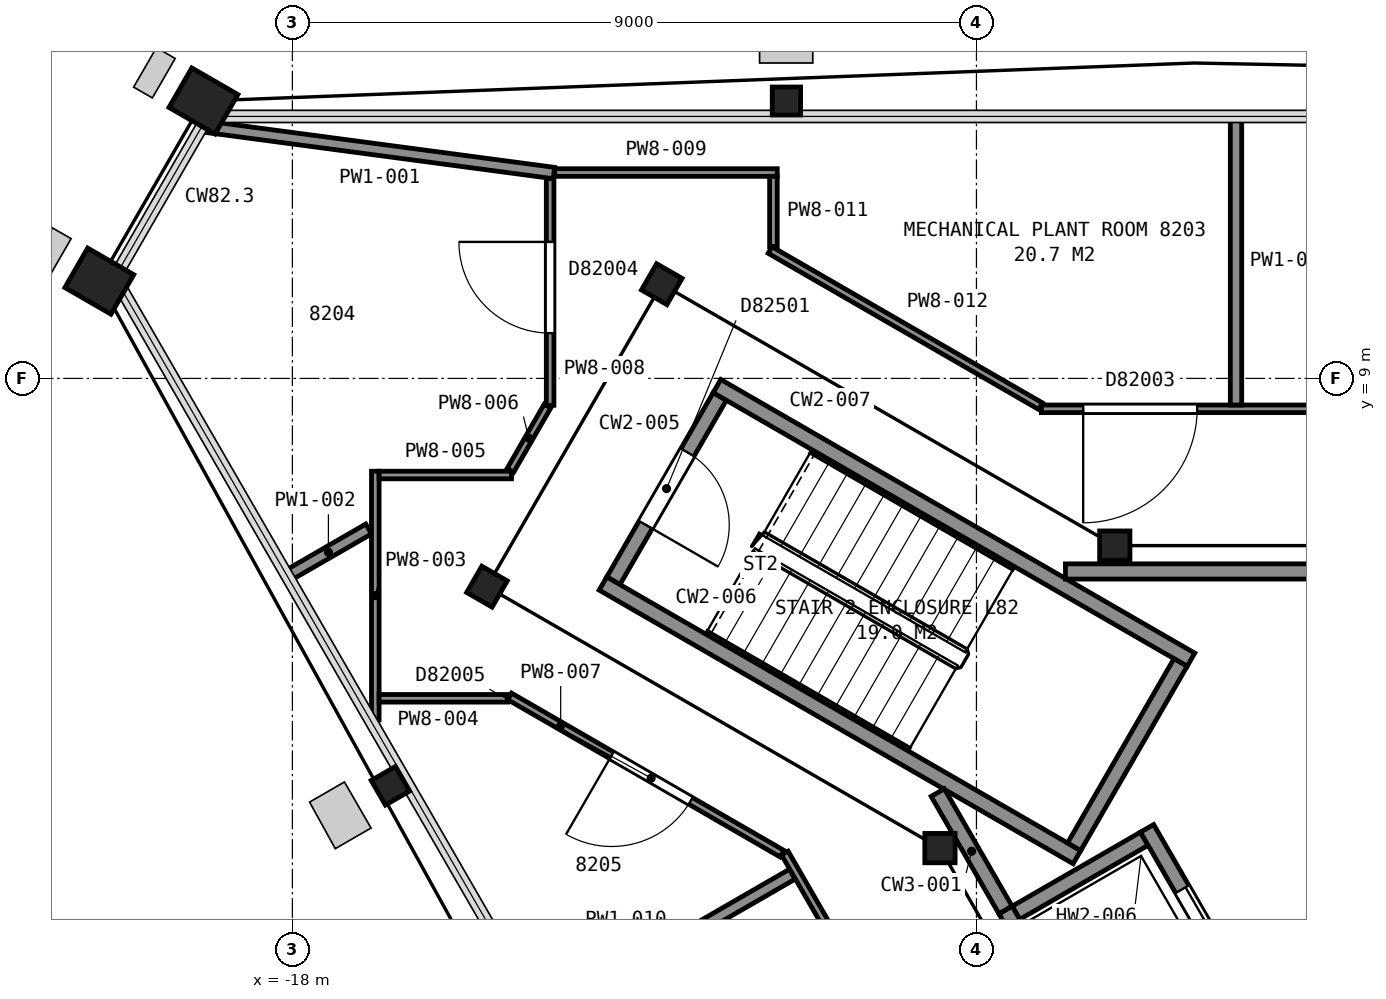
"""IFC4 building model, lengths in metres.
Left out: names, types, materials, properties, quantities, classifications, styles, units other than length and angle.
Written with IfcOpenShell. Run it as: python <this file> out.ifc"""

import sys

from ifc_helpers import new_model, si_unit, direction, frame, frame_2d, origin, origin_2d, place, context, subcontext, project, spatial, rectangle, hollow_rectangle, i_section, extrude, element, fill, save


model = new_model("IFC4")
c1 = context("Model", 3, precision=1e-05, world=origin(), true_north=direction((0.0, 1.0)))
c2 = subcontext(c1, "Body", "Model", "MODEL_VIEW")
j1 = project(units=[si_unit("LENGTHUNIT", "METRE"), si_unit("PLANEANGLEUNIT", "RADIAN")], contexts=[c1])
p1 = place(None, origin())
s1 = spatial("IfcSite", under=j1, at=p1, CompositionType="ELEMENT")
p2 = place(p1, origin())
s2 = spatial("IfcBuilding", under=s1, at=p2, CompositionType="ELEMENT")
p3 = place(p2, frame((0.0, 0.0, 325.2)))
s3 = spatial("IfcBuildingStorey", under=s2, at=p3, CompositionType="ELEMENT", Elevation=325.2)
p4 = place(p3, frame((-11.5, 12.65, 0.0), z_axis=(0.0, 0.0, 1.0), x_axis=(1.0, 0.0, 0.0)))
e1 = element("IfcColumn", 1, at=p4, inside=s3, PredefinedType="COLUMN", context=c2, shape_type="SweptSolid", body=[
    extrude(i_section(OverallWidth=0.373, OverallDepth=0.368, WebThickness=0.015, FlangeThickness=0.024, FilletRadius=0.015, at=origin_2d()), origin(), (0.0, 0.0, 1.0), 4.2),
])
for number, where, z_axis, x_axis in (
    (2, (-19.17, 12.65, 0.0), (0.0, 0.0, 1.0), (0.5, 0.866, 0.0)),
    (3, (-20.54, 10.28, 0.0), (0.0, 0.0, 1.0), (0.5, 0.866, 0.0)),
):
    element("IfcColumn", number, at=place(p3, frame(where, z_axis=z_axis, x_axis=x_axis)), inside=s3, PredefinedType="COLUMN", context=c2, shape_type="SweptSolid", body=[
        extrude(hollow_rectangle(XDim=0.6, YDim=0.7, WallThickness=0.04, at=origin_2d()), origin(), (0.0, 0.0, 1.0), 4.2),
    ])
p5 = place(p3, frame((-16.71, 3.64, 0.0), z_axis=(0.0, 0.0, 1.0), x_axis=(-0.5, 0.866025403784, 0.0)))
e4 = element("IfcColumn", 4, at=p5, inside=s3, PredefinedType="COLUMN", context=c2, shape_type="SweptSolid", body=[
    extrude(i_section(OverallWidth=0.373, OverallDepth=0.368, WebThickness=0.015, FlangeThickness=0.024, FilletRadius=0.015, at=origin_2d()), origin(), (0.0, 0.0, 1.0), 4.2),
])
for number, where, z_axis, x_axis in (
    (5, (-7.18, 6.8, 0.0), (0.0, 0.0, 1.0), (1.0, 0.0, 0.0)),
    (6, (-13.14, 10.24, 0.0), (0.0, 0.0, 1.0), (0.5, 0.866, 0.0)),
    (7, (-15.44, 6.26, 0.0), (0.0, 0.0, 1.0), (0.5, 0.866, 0.0)),
    (8, (-9.48, 2.82, 0.0), (0.0, 0.0, 1.0), (1.0, 0.0, 0.0)),
):
    element("IfcColumn", number, at=place(p3, frame(where, z_axis=z_axis, x_axis=x_axis)), inside=s3, PredefinedType="COLUMN", context=c2, shape_type="SweptSolid", body=[
        extrude(i_section(OverallWidth=0.399, OverallDepth=0.386, WebThickness=0.021, FlangeThickness=0.033, FilletRadius=0.015, at=origin_2d()), origin(), (0.0, 0.0, 1.0), 4.2),
    ])
p6 = place(p3, frame((-12.377, 8.762, 0.0), z_axis=(0.0, 0.0, 1.0), x_axis=(-0.500049511043, -0.865996816683, 0.0)))
e9 = element("IfcWall", 9, at=p6, inside=s3, PredefinedType="PARTITIONING", context=c2, shape_type="SweptSolid", body=[
    extrude(rectangle(XDim=2.8, YDim=0.2, at=frame_2d((1.4, 0.0))), origin(), (0.0, 0.0, 1.0), 3.95),
])
p7 = place(p6, frame((0.85, 0.0, 0.0)))
e10 = element("IfcOpeningElement", 10, at=p7, cuts=e9, PredefinedType="OPENING", context=c2, shape_type="SweptSolid", body=[
    extrude(rectangle(XDim=1.1, YDim=2.1, at=frame_2d((0.55, 1.05))), frame((0.0, 0.11, 0.0), z_axis=(0.0, -1.0, 0.0), x_axis=(1.0, 0.0, 0.0)), (0.0, 0.0, 1.0), 0.22),
])
for number, where, z_axis, x_axis in (
    (11, (-7.678, 2.701, 0.0), (0.0, 0.0, 1.0), (-0.866, 0.5, 0.0)),
    (12, (-6.178, 5.299, 0.0), (0.0, 0.0, 1.0), (-0.866, 0.5, 0.0)),
):
    element("IfcWall", number, at=place(p3, frame(where, z_axis=z_axis, x_axis=x_axis)), inside=s3, PredefinedType="PARTITIONING", context=c2, shape_type="SweptSolid", body=[
        extrude(rectangle(XDim=7.2, YDim=0.2, at=frame_2d((3.6, 0.0))), origin(), (0.0, 0.0, 1.0), 3.95),
    ])
p8 = place(p3, frame((-6.315, 5.262, 0.0), z_axis=(0.0, 0.0, 1.0), x_axis=(-0.500049511043, -0.865996816683, 0.0)))
e13 = element("IfcWall", 13, at=p8, inside=s3, PredefinedType="PARTITIONING", context=c2, shape_type="SweptSolid", body=[
    extrude(rectangle(XDim=2.8, YDim=0.2, at=frame_2d((1.4, 0.0))), origin(), (0.0, 0.0, 1.0), 3.95),
])
p9 = place(p3, frame((-8.48, 1.969, 0.0), z_axis=(0.0, 0.0, 1.0), x_axis=(0.866000020948, 0.500043961785, 0.0)))
e14 = element("IfcWall", 14, at=p9, inside=s3, PredefinedType="PARTITIONING", context=c2, shape_type="SweptSolid", body=[
    extrude(rectangle(XDim=1.95, YDim=0.2, at=frame_2d((0.975, 0.0))), origin(), (0.0, 0.0, 1.0), 4.2),
])
p10 = place(p3, frame((-5.28, 0.525, 0.0), z_axis=(0.0, 0.0, 1.0), x_axis=(-0.500037662692, 0.866003658127, 0.0)))
e15 = element("IfcWall", 15, at=p10, inside=s3, PredefinedType="PARTITIONING", context=c2, shape_type="SweptSolid", body=[
    extrude(rectangle(XDim=2.95, YDim=0.2, at=frame_2d((1.475, 0.0))), origin(), (0.0, 0.0, 1.0), 4.2),
])
p11 = place(p10, frame((0.925, 0.0, 0.0)))
e16 = element("IfcOpeningElement", 16, at=p11, cuts=e15, PredefinedType="OPENING", context=c2, shape_type="SweptSolid", body=[
    extrude(rectangle(XDim=1.1, YDim=2.1, at=frame_2d((0.55, 1.05))), frame((0.0, 0.11, 0.0), z_axis=(0.0, -1.0, 0.0), x_axis=(1.0, 0.0, 0.0)), (0.0, 0.0, 1.0), 0.22),
])
p12 = place(p3, frame((-7.142, -0.55, 0.0), z_axis=(0.0, 0.0, 1.0), x_axis=(-0.49997559174, 0.866039495442, 0.0)))
e17 = element("IfcWall", 17, at=p12, inside=s3, PredefinedType="PARTITIONING", context=c2, shape_type="SweptSolid", body=[
    extrude(rectangle(XDim=2.95, YDim=0.2, at=frame_2d((1.475, 0.0))), origin(), (0.0, 0.0, 1.0), 4.2),
])
p13 = place(p3, frame((-9.509, 3.551, 0.0), z_axis=(0.0, 0.0, 1.0), x_axis=(0.499999136801, -0.866025902152, 0.0)))
e18 = element("IfcWall", 18, at=p13, inside=s3, PredefinedType="PARTITIONING", context=c2, shape_type="SweptSolid", body=[
    extrude(rectangle(XDim=1.782, YDim=0.2, at=frame_2d((0.891, 0.0))), origin(), (0.0, 0.0, 1.0), 3.95),
])
p14 = place(p3, frame((7.829, 6.46, 0.0), z_axis=(0.0, 0.0, 1.0), x_axis=(-1.0, 0.0, 0.0)))
e19 = element("IfcWall", 19, at=p14, inside=s3, PredefinedType="PARTITIONING", context=c2, shape_type="SweptSolid", body=[
    extrude(rectangle(XDim=15.658, YDim=0.2, at=frame_2d((7.829, 0.0))), origin(), (0.0, 0.0, 1.0), 3.95),
])
p15 = place(p14, frame((2.618, 0.0, 0.0)))
e20 = element("IfcOpeningElement", 20, at=p15, cuts=e19, PredefinedType="OPENING", context=c2, shape_type="SweptSolid", body=[
    extrude(rectangle(XDim=1.8, YDim=2.1, at=frame_2d((0.9, 1.05))), frame((0.0, 0.11, 0.0), z_axis=(0.0, -1.0, 0.0), x_axis=(1.0, 0.0, 0.0)), (0.0, 0.0, 1.0), 0.22),
])
p16 = place(p3, frame((-19.143, 12.312, 0.0), z_axis=(0.0, 0.0, 1.0), x_axis=(0.991256927963, -0.131945832693, 0.0)))
e21 = element("IfcWall", 21, at=p16, inside=s3, PredefinedType="PARTITIONING", context=c2, shape_type="SweptSolid", body=[
    extrude(rectangle(XDim=4.624, YDim=0.15, at=frame_2d((2.312, 0.0))), origin(), (0.0, 0.0, 1.0), 3.297),
])
p17 = place(p3, frame((-18.056, 6.408, 0.0), z_axis=(0.0, 0.0, 1.0), x_axis=(0.865986110686, 0.500068051468, 0.0)))
e22 = element("IfcWall", 22, at=p17, inside=s3, PredefinedType="PARTITIONING", context=c2, shape_type="SweptSolid", body=[
    extrude(rectangle(XDim=1.223, YDim=0.15, at=frame_2d((0.611, 0.0))), origin(), (0.0, 0.0, 1.0), 3.297),
])
p18 = place(p3, frame((-16.909, 4.507, 0.0), z_axis=(0.0, 0.0, 1.0), x_axis=(0.0, 1.0, 0.0)))
e23 = element("IfcWall", 23, at=p18, inside=s3, PredefinedType="PARTITIONING", context=c2, shape_type="SweptSolid", body=[
    extrude(rectangle(XDim=3.272, YDim=0.1, at=frame_2d((1.636, 0.0))), origin(), (0.0, 0.0, 1.0), 3.297),
])
p19 = place(p3, frame((-16.859, 4.791, 0.0), z_axis=(0.0, 0.0, 1.0), x_axis=(1.0, 0.0, 0.0)))
e24 = element("IfcWall", 24, at=p19, inside=s3, PredefinedType="PARTITIONING", context=c2, shape_type="SweptSolid", body=[
    extrude(rectangle(XDim=1.691, YDim=0.1, at=frame_2d((0.845, 0.0))), origin(), (0.0, 0.0, 1.0), 3.297),
])
p20 = place(p3, frame((-16.859, 7.729, 0.0), z_axis=(0.0, 0.0, 1.0), x_axis=(1.0, 0.0, 0.0)))
e25 = element("IfcWall", 25, at=p20, inside=s3, PredefinedType="PARTITIONING", context=c2, shape_type="SweptSolid", body=[
    extrude(rectangle(XDim=1.742, YDim=0.1, at=frame_2d((0.871, 0.0))), origin(), (0.0, 0.0, 1.0), 3.297),
])
p21 = place(p3, frame((-15.132, 7.79, 0.0), z_axis=(0.0, 0.0, 1.0), x_axis=(0.499823463829, 0.866127303003, 0.0)))
e26 = element("IfcWall", 26, at=p21, inside=s3, PredefinedType="PARTITIONING", context=c2, shape_type="SweptSolid", body=[
    extrude(rectangle(XDim=0.976, YDim=0.1, at=frame_2d((0.488, 0.0))), origin(), (0.0, 0.0, 1.0), 3.297),
])
p22 = place(p3, frame((-11.557, 2.746, 0.0), z_axis=(0.0, 0.0, 1.0), x_axis=(-0.866005840187, 0.500033883614, 0.0)))
e27 = element("IfcWall", 27, at=p22, inside=s3, PredefinedType="PARTITIONING", context=c2, shape_type="SweptSolid", body=[
    extrude(rectangle(XDim=4.139, YDim=0.1, at=frame_2d((2.07, 0.0))), origin(), (0.0, 0.0, 1.0), 3.297),
])
p23 = place(p22, frame((1.389, 0.0, 0.0)))
e28 = element("IfcOpeningElement", 28, at=p23, cuts=e27, PredefinedType="OPENING", context=c2, shape_type="SweptSolid", body=[
    extrude(rectangle(XDim=1.2, YDim=2.1, at=frame_2d((0.6, 1.05))), frame((0.0, 0.06, 0.0), z_axis=(0.0, -1.0, 0.0), x_axis=(1.0, 0.0, 0.0)), (0.0, 0.0, 1.0), 0.12),
])
p24 = place(p3, frame((-14.609, 8.646, 0.0), z_axis=(0.0, 0.0, 1.0), x_axis=(0.0, 1.0, 0.0)))
e29 = element("IfcWall", 29, at=p24, inside=s3, PredefinedType="PARTITIONING", context=c2, shape_type="SweptSolid", body=[
    extrude(rectangle(XDim=2.983, YDim=0.1, at=frame_2d((1.491, 0.0))), origin(), (0.0, 0.0, 1.0), 3.297),
])
p25 = place(p24, frame((0.95, 0.0, 0.0)))
e30 = element("IfcOpeningElement", 30, at=p25, cuts=e29, PredefinedType="OPENING", context=c2, shape_type="SweptSolid", body=[
    extrude(rectangle(XDim=1.2, YDim=2.1, at=frame_2d((0.6, 1.05))), frame((0.0, 0.06, 0.0), z_axis=(0.0, -1.0, 0.0), x_axis=(1.0, 0.0, 0.0)), (0.0, 0.0, 1.0), 0.12),
])
p26 = place(p3, frame((-14.549, 11.709, 0.0), z_axis=(0.0, 0.0, 1.0), x_axis=(1.0, 0.0, 0.0)))
e31 = element("IfcWall", 31, at=p26, inside=s3, PredefinedType="PARTITIONING", context=c2, shape_type="SweptSolid", body=[
    extrude(rectangle(XDim=2.928, YDim=0.1, at=frame_2d((1.464, 0.0))), origin(), (0.0, 0.0, 1.0), 3.297),
])
p27 = place(p3, frame((-14.696, 0.588, 0.0), z_axis=(0.0, 0.0, 1.0), x_axis=(0.866115649152, 0.499843657852, 0.0)))
e32 = element("IfcWall", 32, at=p27, inside=s3, PredefinedType="PARTITIONING", context=c2, shape_type="SweptSolid", body=[
    extrude(rectangle(XDim=3.778, YDim=0.15, at=frame_2d((1.889, 0.0))), origin(), (0.0, 0.0, 1.0), 3.297),
])
p28 = place(p3, frame((-11.671, 10.734, 0.0), z_axis=(0.0, 0.0, 1.0), x_axis=(0.0, 1.0, 0.0)))
e33 = element("IfcWall", 33, at=p28, inside=s3, PredefinedType="PARTITIONING", context=c2, shape_type="SweptSolid", body=[
    extrude(rectangle(XDim=0.925, YDim=0.1, at=frame_2d((0.462, 0.0))), origin(), (0.0, 0.0, 1.0), 3.297),
])
p29 = place(p3, frame((-11.714, 10.689, 0.0), z_axis=(0.0, 0.0, 1.0), x_axis=(0.866029215606, -0.499993397673, 0.0)))
e34 = element("IfcWall", 34, at=p29, inside=s3, PredefinedType="PARTITIONING", context=c2, shape_type="SweptSolid", body=[
    extrude(rectangle(XDim=4.108, YDim=0.1, at=frame_2d((2.054, 0.0))), origin(), (0.0, 0.0, 1.0), 3.297),
])
p30 = place(p3, frame((-3.744, -10.714, 0.0), z_axis=(0.0, 0.0, 1.0), x_axis=(-0.500044034969, 0.86599997869, 0.0)))
e35 = element("IfcWall", 35, at=p30, inside=s3, PredefinedType="PARTITIONING", context=c2, shape_type="SweptSolid", body=[
    extrude(rectangle(XDim=15.553, YDim=0.1, at=frame_2d((7.776, 0.0))), origin(), (0.0, 0.0, 1.0), 3.297),
])
p31 = place(p30, frame((11.314, 0.0, 0.0)))
e36 = element("IfcOpeningElement", 36, at=p31, cuts=e35, PredefinedType="OPENING", context=c2, shape_type="SweptSolid", body=[
    extrude(rectangle(XDim=1.2, YDim=2.1, at=frame_2d((0.6, 1.05))), frame((0.0, 0.06, 0.0), z_axis=(0.0, -1.0, 0.0), x_axis=(1.0, 0.0, 0.0)), (0.0, 0.0, 1.0), 0.12),
])
p32 = place(p30, frame((4.593, 0.0, 0.0)))
e37 = element("IfcOpeningElement", 37, at=p32, cuts=e35, PredefinedType="OPENING", context=c2, shape_type="SweptSolid", body=[
    extrude(rectangle(XDim=1.2, YDim=2.1, at=frame_2d((0.6, 1.05))), frame((0.0, 0.06, 0.0), z_axis=(0.0, -1.0, 0.0), x_axis=(1.0, 0.0, 0.0)), (0.0, 0.0, 1.0), 0.12),
])
p33 = place(p3, frame((-8.146, 8.6, 0.0), z_axis=(0.0, 0.0, 1.0), x_axis=(1.0, 0.0, 0.0)))
e38 = element("IfcWall", 38, at=p33, inside=s3, PredefinedType="PARTITIONING", context=c2, shape_type="SweptSolid", body=[
    extrude(rectangle(XDim=16.292, YDim=0.1, at=frame_2d((8.146, 0.0))), origin(), (0.0, 0.0, 1.0), 3.297),
])
p34 = place(p33, frame((8.511, 0.0, 0.0)))
e39 = element("IfcOpeningElement", 39, at=p34, cuts=e38, PredefinedType="OPENING", context=c2, shape_type="SweptSolid", body=[
    extrude(rectangle(XDim=1.5, YDim=2.1, at=frame_2d((0.75, 1.05))), frame((0.0, 0.06, 0.0), z_axis=(0.0, -1.0, 0.0), x_axis=(1.0, 0.0, 0.0)), (0.0, 0.0, 1.0), 0.12),
])
p35 = place(p33, frame((0.55, 0.0, 0.0)))
e40 = element("IfcOpeningElement", 40, at=p35, cuts=e38, PredefinedType="OPENING", context=c2, shape_type="SweptSolid", body=[
    extrude(rectangle(XDim=1.5, YDim=2.1, at=frame_2d((0.75, 1.05))), frame((0.0, 0.06, 0.0), z_axis=(0.0, -1.0, 0.0), x_axis=(1.0, 0.0, 0.0)), (0.0, 0.0, 1.0), 0.12),
])
p36 = place(p3, frame((-5.585, 8.65, 0.0), z_axis=(0.0, 0.0, 1.0), x_axis=(0.0, 1.0, 0.0)))
e41 = element("IfcWall", 41, at=p36, inside=s3, PredefinedType="PARTITIONING", context=c2, shape_type="SweptSolid", body=[
    extrude(rectangle(XDim=3.783, YDim=0.15, at=frame_2d((1.892, 0.0))), origin(), (0.0, 0.0, 1.0), 3.297),
])
p37 = place(p7, origin())
e42 = element("IfcDoor", 42, at=p37, inside=s3, OperationType="SINGLE_SWING_RIGHT", PredefinedType="DOOR", context=c2, shape_type="SweptSolid", body=[
    extrude(rectangle(XDim=1.1, YDim=2.1, at=frame_2d((0.55, 1.05))), frame((0.0, 0.025, 0.0), z_axis=(0.0, -1.0, 0.0), x_axis=(1.0, 0.0, 0.0)), (0.0, 0.0, 1.0), 0.05),
])
fill(e10, e42)
p38 = place(p11, origin())
e43 = element("IfcDoor", 43, at=p38, inside=s3, OperationType="SLIDING_TO_LEFT", PredefinedType="DOOR", context=c2, shape_type="SweptSolid", body=[
    extrude(rectangle(XDim=1.1, YDim=2.1, at=frame_2d((0.55, 1.05))), frame((0.0, 0.025, 0.0), z_axis=(0.0, -1.0, 0.0), x_axis=(1.0, 0.0, 0.0)), (0.0, 0.0, 1.0), 0.05),
])
fill(e16, e43)
p39 = place(p23, origin())
e44 = element("IfcDoor", 44, at=p39, inside=s3, OperationType="SINGLE_SWING_RIGHT", PredefinedType="DOOR", context=c2, shape_type="SweptSolid", body=[
    extrude(rectangle(XDim=1.2, YDim=2.1, at=frame_2d((0.6, 1.05))), frame((0.0, 0.025, 0.0), z_axis=(0.0, -1.0, 0.0), x_axis=(1.0, 0.0, 0.0)), (0.0, 0.0, 1.0), 0.05),
])
fill(e28, e44)
p40 = place(p25, origin())
e45 = element("IfcDoor", 45, at=p40, inside=s3, OperationType="SINGLE_SWING_RIGHT", PredefinedType="DOOR", context=c2, shape_type="SweptSolid", body=[
    extrude(rectangle(XDim=1.2, YDim=2.1, at=frame_2d((0.6, 1.05))), frame((0.0, 0.025, 0.0), z_axis=(0.0, -1.0, 0.0), x_axis=(1.0, 0.0, 0.0)), (0.0, 0.0, 1.0), 0.05),
])
fill(e30, e45)
p41 = place(p35, origin())
e46 = element("IfcDoor", 46, at=p41, inside=s3, OperationType="DOUBLE_DOOR_SINGLE_SWING", PredefinedType="DOOR", context=c2, shape_type="SweptSolid", body=[
    extrude(rectangle(XDim=1.5, YDim=2.1, at=frame_2d((0.75, 1.05))), frame((0.0, 0.025, 0.0), z_axis=(0.0, -1.0, 0.0), x_axis=(1.0, 0.0, 0.0)), (0.0, 0.0, 1.0), 0.05),
])
fill(e40, e46)
save(model, sys.argv[1])
